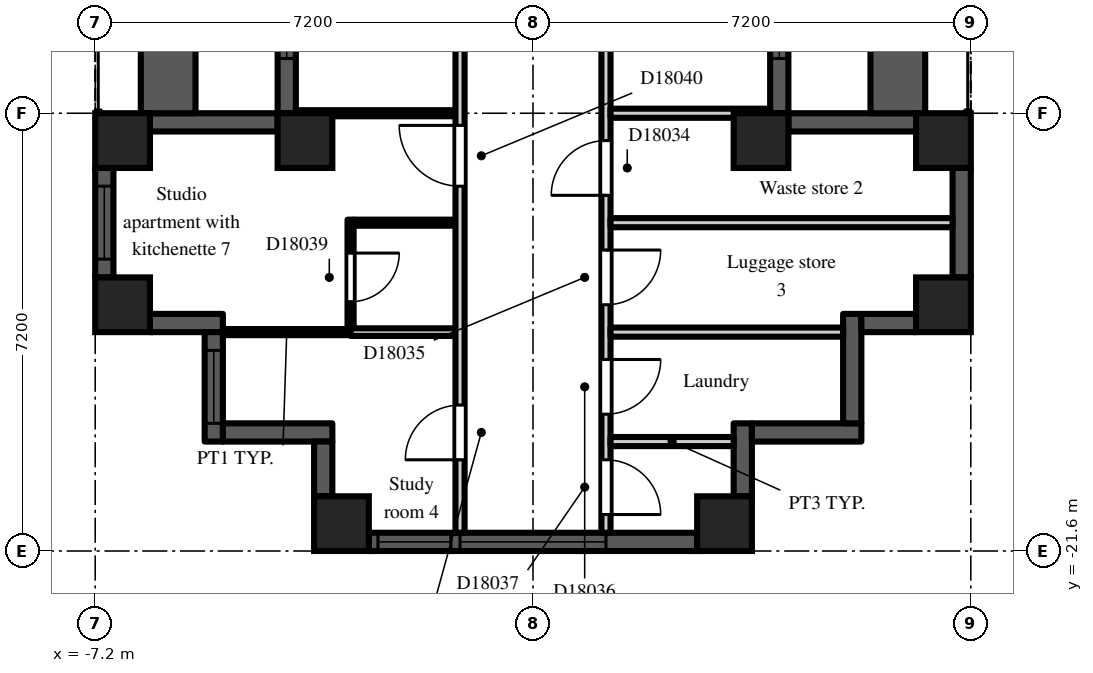
"""IFC4 building model, lengths in metres.
Left out: names, types, materials, properties, quantities, classifications, styles, units other than length and angle.
Written with IfcOpenShell. Run it as: python <this file> out.ifc"""

import sys

from ifc_helpers import new_model, si_unit, direction, frame, frame_2d, origin, origin_2d, place, context, subcontext, project, spatial, rectangle, extrude, element, fill, save


model = new_model("IFC4")
c1 = context("Model", 3, precision=1e-05, world=origin(), true_north=direction((0.0, 1.0)))
c2 = subcontext(c1, "Body", "Model", "MODEL_VIEW")
j1 = project(units=[si_unit("LENGTHUNIT", "METRE"), si_unit("PLANEANGLEUNIT", "RADIAN")], contexts=[c1])
p1 = place(None, origin())
s1 = spatial("IfcSite", under=j1, at=p1, CompositionType="ELEMENT")
p2 = place(p1, origin())
s2 = spatial("IfcBuilding", under=s1, at=p2, CompositionType="ELEMENT")
p3 = place(p2, frame((0.0, 0.0, 123.3)))
s3 = spatial("IfcBuildingStorey", under=s2, at=p3, CompositionType="ELEMENT", Elevation=123.3)
for number, where, z_axis, x_axis in (
    (1, (-6.75, -17.55, 0.0), (0.0, 0.0, 1.0), (1.0, 0.0, 0.0)),
    (2, (-6.75, -14.85, 0.0), (0.0, 0.0, 1.0), (1.0, 0.0, 0.0)),
    (3, (-3.75, -14.85, 0.0), (0.0, 0.0, 1.0), (1.0, 0.0, 0.0)),
    (4, (-3.15, -21.15, 0.0), (0.0, 0.0, 1.0), (1.0, 0.0, 0.0)),
    (5, (3.15, -21.15, 0.0), (0.0, 0.0, 1.0), (1.0, 0.0, 0.0)),
    (6, (3.75, -14.85, 0.0), (0.0, 0.0, 1.0), (1.0, 0.0, 0.0)),
    (7, (6.75, -17.55, 0.0), (0.0, 0.0, 1.0), (1.0, 0.0, 0.0)),
    (8, (6.75, -14.85, 0.0), (0.0, 0.0, 1.0), (1.0, 0.0, 0.0)),
):
    element("IfcColumn", number, at=place(p3, frame(where, z_axis=z_axis, x_axis=x_axis)), inside=s3, PredefinedType="COLUMN", context=c2, shape_type="SweptSolid", body=[
        extrude(rectangle(XDim=0.9, YDim=0.9, at=origin_2d()), origin(), (0.0, 0.0, 1.0), 3.0),
    ])
p4 = place(p3, frame((-4.05, -7.2, 0.0), z_axis=(0.0, 0.0, 1.0), x_axis=(0.0, -1.0, 0.0)))
e9 = element("IfcWall", 9, at=p4, inside=s3, PredefinedType="SOLIDWALL", context=c2, shape_type="SweptSolid", body=[
    extrude(rectangle(XDim=7.2, YDim=0.3, at=frame_2d((3.6, 0.0))), origin(), (0.0, 0.0, 1.0), 2.2),
])
p5 = place(p4, frame((3.0, 0.0, 0.0)))
e10 = element("IfcOpeningElement", 10, at=p5, cuts=e9, PredefinedType="OPENING", context=c2, shape_type="SweptSolid", body=[
    extrude(rectangle(XDim=1.2, YDim=2.05, at=frame_2d((0.6, 1.025))), frame((0.0, 0.16, 0.0), z_axis=(0.0, -1.0, 0.0), x_axis=(1.0, 0.0, 0.0)), (0.0, 0.0, 1.0), 0.32),
])
p6 = place(p4, frame((0.9, 0.0, 0.2)))
e11 = element("IfcOpeningElement", 11, at=p6, cuts=e9, PredefinedType="OPENING", context=c2, shape_type="SweptSolid", body=[
    extrude(rectangle(XDim=1.8, YDim=1.85, at=frame_2d((0.9, 0.925))), frame((0.0, 0.16, 0.0), z_axis=(0.0, -1.0, 0.0), x_axis=(1.0, 0.0, 0.0)), (0.0, 0.0, 1.0), 0.32),
])
p7 = place(p4, frame((4.5, 0.0, 0.2)))
e12 = element("IfcOpeningElement", 12, at=p7, cuts=e9, PredefinedType="OPENING", context=c2, shape_type="SweptSolid", body=[
    extrude(rectangle(XDim=1.8, YDim=1.85, at=frame_2d((0.9, 0.925))), frame((0.0, 0.16, 0.0), z_axis=(0.0, -1.0, 0.0), x_axis=(1.0, 0.0, 0.0)), (0.0, 0.0, 1.0), 0.32),
])
p8 = place(p3, frame((-4.2, -14.55, 0.0), z_axis=(0.0, 0.0, 1.0), x_axis=(-1.0, 0.0, 0.0)))
e13 = element("IfcWall", 13, at=p8, inside=s3, PredefinedType="SOLIDWALL", context=c2, shape_type="SweptSolid", body=[
    extrude(rectangle(XDim=2.1, YDim=0.3, at=frame_2d((1.05, 0.0))), origin(), (0.0, 0.0, 1.0), 2.2),
])
p9 = place(p3, frame((-7.05, -15.3, 0.0), z_axis=(0.0, 0.0, 1.0), x_axis=(0.0, -1.0, 0.0)))
e14 = element("IfcWall", 14, at=p9, inside=s3, PredefinedType="SOLIDWALL", context=c2, shape_type="SweptSolid", body=[
    extrude(rectangle(XDim=1.8, YDim=0.3, at=frame_2d((0.9, 0.0))), origin(), (0.0, 0.0, 1.0), 2.2),
])
p10 = place(p9, frame((0.3, 0.0, 0.2)))
e15 = element("IfcOpeningElement", 15, at=p10, cuts=e14, PredefinedType="OPENING", context=c2, shape_type="SweptSolid", body=[
    extrude(rectangle(XDim=1.2, YDim=1.85, at=frame_2d((0.6, 0.925))), frame((0.0, 0.16, 0.0), z_axis=(0.0, -1.0, 0.0), x_axis=(1.0, 0.0, 0.0)), (0.0, 0.0, 1.0), 0.32),
])
p11 = place(p3, frame((-6.3, -17.85, 0.0), z_axis=(0.0, 0.0, 1.0), x_axis=(1.0, 0.0, 0.0)))
e16 = element("IfcWall", 16, at=p11, inside=s3, PredefinedType="SOLIDWALL", context=c2, shape_type="SweptSolid", body=[
    extrude(rectangle(XDim=1.2, YDim=0.3, at=frame_2d((0.6, 0.0))), origin(), (0.0, 0.0, 1.0), 2.6),
])
p12 = place(p3, frame((-5.25, -18.0, 0.0), z_axis=(0.0, 0.0, 1.0), x_axis=(0.0, -1.0, 0.0)))
e17 = element("IfcWall", 17, at=p12, inside=s3, PredefinedType="SOLIDWALL", context=c2, shape_type="SweptSolid", body=[
    extrude(rectangle(XDim=1.8, YDim=0.3, at=frame_2d((0.9, 0.0))), origin(), (0.0, 0.0, 1.0), 2.6),
])
p13 = place(p12, frame((0.3, 0.0, 0.2)))
e18 = element("IfcOpeningElement", 18, at=p13, cuts=e17, PredefinedType="OPENING", context=c2, shape_type="SweptSolid", body=[
    extrude(rectangle(XDim=1.2, YDim=1.85, at=frame_2d((0.6, 0.925))), frame((0.0, 0.16, 0.0), z_axis=(0.0, -1.0, 0.0), x_axis=(1.0, 0.0, 0.0)), (0.0, 0.0, 1.0), 0.32),
])
p14 = place(p3, frame((-5.1, -19.65, 0.0), z_axis=(0.0, 0.0, 1.0), x_axis=(1.0, 0.0, 0.0)))
e19 = element("IfcWall", 19, at=p14, inside=s3, PredefinedType="SOLIDWALL", context=c2, shape_type="SweptSolid", body=[
    extrude(rectangle(XDim=1.8, YDim=0.3, at=frame_2d((0.9, 0.0))), origin(), (0.0, 0.0, 1.0), 2.6),
])
p15 = place(p3, frame((-3.45, -19.8, 0.0), z_axis=(0.0, 0.0, 1.0), x_axis=(0.0, -1.0, 0.0)))
e20 = element("IfcWall", 20, at=p15, inside=s3, PredefinedType="SOLIDWALL", context=c2, shape_type="SweptSolid", body=[
    extrude(rectangle(XDim=0.9, YDim=0.3, at=frame_2d((0.45, 0.0))), origin(), (0.0, 0.0, 1.0), 2.6),
])
p16 = place(p3, frame((-2.7, -21.45, 0.0), z_axis=(0.0, 0.0, 1.0), x_axis=(1.0, 0.0, 0.0)))
e21 = element("IfcWall", 21, at=p16, inside=s3, PredefinedType="SOLIDWALL", context=c2, shape_type="SweptSolid", body=[
    extrude(rectangle(XDim=5.4, YDim=0.3, at=frame_2d((2.7, 0.0))), origin(), (0.0, 0.0, 1.0), 2.2),
])
p17 = place(p16, frame((1.5, 0.0, 0.2)))
e22 = element("IfcOpeningElement", 22, at=p17, cuts=e21, PredefinedType="OPENING", context=c2, shape_type="SweptSolid", body=[
    extrude(rectangle(XDim=2.4, YDim=1.85, at=frame_2d((1.2, 0.925))), frame((0.0, 0.16, 0.0), z_axis=(0.0, -1.0, 0.0), x_axis=(1.0, 0.0, 0.0)), (0.0, 0.0, 1.0), 0.32),
])
p18 = place(p16, frame((0.15, 0.0, 0.2)))
e23 = element("IfcOpeningElement", 23, at=p18, cuts=e21, PredefinedType="OPENING", context=c2, shape_type="SweptSolid", body=[
    extrude(rectangle(XDim=1.2, YDim=1.85, at=frame_2d((0.6, 0.925))), frame((0.0, 0.16, 0.0), z_axis=(0.0, -1.0, 0.0), x_axis=(1.0, 0.0, 0.0)), (0.0, 0.0, 1.0), 0.32),
])
p19 = place(p3, frame((3.45, -20.7, 0.0), z_axis=(0.0, 0.0, 1.0), x_axis=(0.0, 1.0, 0.0)))
e24 = element("IfcWall", 24, at=p19, inside=s3, PredefinedType="SOLIDWALL", context=c2, shape_type="SweptSolid", body=[
    extrude(rectangle(XDim=1.2, YDim=0.3, at=frame_2d((0.6, 0.0))), origin(), (0.0, 0.0, 1.0), 2.6),
])
p20 = place(p3, frame((3.6, -19.65, 0.0), z_axis=(0.0, 0.0, 1.0), x_axis=(1.0, 0.0, 0.0)))
e25 = element("IfcWall", 25, at=p20, inside=s3, PredefinedType="SOLIDWALL", context=c2, shape_type="SweptSolid", body=[
    extrude(rectangle(XDim=1.8, YDim=0.3, at=frame_2d((0.9, 0.0))), origin(), (0.0, 0.0, 1.0), 2.6),
])
p21 = place(p3, frame((5.25, -19.5, 0.0), z_axis=(0.0, 0.0, 1.0), x_axis=(0.0, 1.0, 0.0)))
e26 = element("IfcWall", 26, at=p21, inside=s3, PredefinedType="SOLIDWALL", context=c2, shape_type="SweptSolid", body=[
    extrude(rectangle(XDim=1.8, YDim=0.3, at=frame_2d((0.9, 0.0))), origin(), (0.0, 0.0, 1.0), 2.6),
])
p22 = place(p3, frame((5.4, -17.85, 0.0), z_axis=(0.0, 0.0, 1.0), x_axis=(1.0, 0.0, 0.0)))
e27 = element("IfcWall", 27, at=p22, inside=s3, PredefinedType="SOLIDWALL", context=c2, shape_type="SweptSolid", body=[
    extrude(rectangle(XDim=0.9, YDim=0.3, at=frame_2d((0.45, 0.0))), origin(), (0.0, 0.0, 1.0), 2.6),
])
p23 = place(p3, frame((7.05, -17.1, 0.0), z_axis=(0.0, 0.0, 1.0), x_axis=(0.0, 1.0, 0.0)))
e28 = element("IfcWall", 28, at=p23, inside=s3, PredefinedType="SOLIDWALL", context=c2, shape_type="SweptSolid", body=[
    extrude(rectangle(XDim=1.8, YDim=0.3, at=frame_2d((0.9, 0.0))), origin(), (0.0, 0.0, 1.0), 2.2),
])
p24 = place(p3, frame((6.3, -14.55, 0.0), z_axis=(0.0, 0.0, 1.0), x_axis=(-1.0, 0.0, 0.0)))
e29 = element("IfcWall", 29, at=p24, inside=s3, PredefinedType="SOLIDWALL", context=c2, shape_type="SweptSolid", body=[
    extrude(rectangle(XDim=2.1, YDim=0.3, at=frame_2d((1.05, 0.0))), origin(), (0.0, 0.0, 1.0), 2.2),
])
p25 = place(p3, frame((4.05, -14.4, 0.0), z_axis=(0.0, 0.0, 1.0), x_axis=(0.0, 1.0, 0.0)))
e30 = element("IfcWall", 30, at=p25, inside=s3, PredefinedType="SOLIDWALL", context=c2, shape_type="SweptSolid", body=[
    extrude(rectangle(XDim=7.2, YDim=0.3, at=frame_2d((3.6, 0.0))), origin(), (0.0, 0.0, 1.0), 2.2),
])
p26 = place(p25, frame((3.0, 0.0, 0.0)))
e31 = element("IfcOpeningElement", 31, at=p26, cuts=e30, PredefinedType="OPENING", context=c2, shape_type="SweptSolid", body=[
    extrude(rectangle(XDim=1.2, YDim=2.05, at=frame_2d((0.6, 1.025))), frame((0.0, 0.16, 0.0), z_axis=(0.0, -1.0, 0.0), x_axis=(1.0, 0.0, 0.0)), (0.0, 0.0, 1.0), 0.32),
])
p27 = place(p25, frame((0.9, 0.0, 0.2)))
e32 = element("IfcOpeningElement", 32, at=p27, cuts=e30, PredefinedType="OPENING", context=c2, shape_type="SweptSolid", body=[
    extrude(rectangle(XDim=1.8, YDim=1.85, at=frame_2d((0.9, 0.925))), frame((0.0, 0.16, 0.0), z_axis=(0.0, -1.0, 0.0), x_axis=(1.0, 0.0, 0.0)), (0.0, 0.0, 1.0), 0.32),
])
p28 = place(p25, frame((4.5, 0.0, 0.2)))
e33 = element("IfcOpeningElement", 33, at=p28, cuts=e30, PredefinedType="OPENING", context=c2, shape_type="SweptSolid", body=[
    extrude(rectangle(XDim=1.8, YDim=1.85, at=frame_2d((0.9, 0.925))), frame((0.0, 0.16, 0.0), z_axis=(0.0, -1.0, 0.0), x_axis=(1.0, 0.0, 0.0)), (0.0, 0.0, 1.0), 0.32),
])
for number, where, z_axis, x_axis in (
    (34, (6.0, -14.4, 0.0), (0.0, 0.0, 1.0), (0.0, 1.0, 0.0)),
    (35, (-6.0, -14.4, 0.0), (0.0, 0.0, 1.0), (0.0, 1.0, 0.0)),
):
    element("IfcWall", number, at=place(p3, frame(where, z_axis=z_axis, x_axis=x_axis)), inside=s3, PredefinedType="PARAPET", context=c2, shape_type="SweptSolid", body=[
        extrude(rectangle(XDim=7.2, YDim=0.9, at=frame_2d((3.6, 0.0))), origin(), (0.0, 0.0, 1.0), 0.8),
    ])
p29 = place(p3, frame((-5.1, -18.0, 0.0), z_axis=(0.0, 0.0, 1.0), x_axis=(1.0, 0.0, 0.0)))
e36 = element("IfcWall", 36, at=p29, inside=s3, PredefinedType="PARTITIONING", context=c2, shape_type="SweptSolid", body=[
    extrude(rectangle(XDim=2.1, YDim=0.1, at=frame_2d((1.05, 0.0))), origin(), (0.0, 0.0, 1.0), 2.6),
])
p30 = place(p3, frame((-3.9, -14.4, 0.0), z_axis=(0.0, 0.0, 1.0), x_axis=(1.0, 0.0, 0.0)))
e37 = element("IfcWall", 37, at=p30, inside=s3, PredefinedType="PARTITIONING", context=c2, shape_type="SweptSolid", body=[
    extrude(rectangle(XDim=2.625, YDim=0.1, at=frame_2d((1.312, 0.0))), origin(), (0.0, 0.0, 1.0), 2.6),
])
p31 = place(p3, frame((-3.0, -17.938, 0.0), z_axis=(0.0, 0.0, 1.0), x_axis=(0.0, 1.0, 0.0)))
e38 = element("IfcWall", 38, at=p31, inside=s3, PredefinedType="PARTITIONING", context=c2, shape_type="SweptSolid", body=[
    extrude(rectangle(XDim=1.788, YDim=0.1, at=frame_2d((0.894, 0.0))), origin(), (0.0, 0.0, 1.0), 2.6),
])
p32 = place(p31, frame((0.438, 0.0, 0.0)))
e39 = element("IfcOpeningElement", 39, at=p32, cuts=e38, PredefinedType="OPENING", context=c2, shape_type="SweptSolid", body=[
    extrude(rectangle(XDim=0.8, YDim=2.1, at=frame_2d((0.4, 1.05))), frame((0.0, 0.06, 0.0), z_axis=(0.0, -1.0, 0.0), x_axis=(1.0, 0.0, 0.0)), (0.0, 0.0, 1.0), 0.12),
])
p33 = place(p3, frame((-3.0, -18.0, 0.0), z_axis=(0.0, 0.0, 1.0), x_axis=(1.0, 0.0, 0.0)))
e40 = element("IfcWall", 40, at=p33, inside=s3, PredefinedType="PARTITIONING", context=c2, shape_type="SweptSolid", body=[
    extrude(rectangle(XDim=1.725, YDim=0.125, at=frame_2d((0.863, 0.0))), origin(), (0.0, 0.0, 1.0), 2.6),
])
p34 = place(p3, frame((-2.95, -16.2, 0.0), z_axis=(0.0, 0.0, 1.0), x_axis=(1.0, 0.0, 0.0)))
e41 = element("IfcWall", 41, at=p34, inside=s3, PredefinedType="PARTITIONING", context=c2, shape_type="SweptSolid", body=[
    extrude(rectangle(XDim=1.675, YDim=0.1, at=frame_2d((0.837, 0.0))), origin(), (0.0, 0.0, 1.0), 2.6),
])
p35 = place(p3, frame((-1.2, -21.3, 0.0), z_axis=(0.0, 0.0, 1.0), x_axis=(0.0, 1.0, 0.0)))
e42 = element("IfcWall", 42, at=p35, inside=s3, PredefinedType="PARTITIONING", context=c2, shape_type="SweptSolid", body=[
    extrude(rectangle(XDim=14.025, YDim=0.15, at=frame_2d((7.013, 0.0))), origin(), (0.0, 0.0, 1.0), 2.6),
])
p36 = place(p35, frame((11.85, 0.0, 0.0)))
e43 = element("IfcOpeningElement", 43, at=p36, cuts=e42, PredefinedType="OPENING", context=c2, shape_type="SweptSolid", body=[
    extrude(rectangle(XDim=0.9, YDim=2.1, at=frame_2d((0.45, 1.05))), frame((0.0, 0.085, 0.0), z_axis=(0.0, -1.0, 0.0), x_axis=(1.0, 0.0, 0.0)), (0.0, 0.0, 1.0), 0.17),
])
p37 = place(p35, frame((5.7, 0.0, 0.0)))
e44 = element("IfcOpeningElement", 44, at=p37, cuts=e42, PredefinedType="OPENING", context=c2, shape_type="SweptSolid", body=[
    extrude(rectangle(XDim=1.0, YDim=2.1, at=frame_2d((0.5, 1.05))), frame((0.0, 0.085, 0.0), z_axis=(0.0, -1.0, 0.0), x_axis=(1.0, 0.0, 0.0)), (0.0, 0.0, 1.0), 0.17),
])
p38 = place(p35, frame((1.2, 0.0, 0.0)))
e45 = element("IfcOpeningElement", 45, at=p38, cuts=e42, PredefinedType="OPENING", context=c2, shape_type="SweptSolid", body=[
    extrude(rectangle(XDim=0.9, YDim=2.1, at=frame_2d((0.45, 1.05))), frame((0.0, 0.085, 0.0), z_axis=(0.0, -1.0, 0.0), x_axis=(1.0, 0.0, 0.0)), (0.0, 0.0, 1.0), 0.17),
])
p39 = place(p3, frame((1.2, -21.3, 0.0), z_axis=(0.0, 0.0, 1.0), x_axis=(0.0, 1.0, 0.0)))
e46 = element("IfcWall", 46, at=p39, inside=s3, PredefinedType="PARTITIONING", context=c2, shape_type="SweptSolid", body=[
    extrude(rectangle(XDim=14.175, YDim=0.15, at=frame_2d((7.087, 0.0))), origin(), (0.0, 0.0, 1.0), 2.6),
])
p40 = place(p39, frame((8.25, 0.0, 0.0)))
e47 = element("IfcOpeningElement", 47, at=p40, cuts=e46, PredefinedType="OPENING", context=c2, shape_type="SweptSolid", body=[
    extrude(rectangle(XDim=0.9, YDim=2.1, at=frame_2d((0.45, 1.05))), frame((0.0, 0.085, 0.0), z_axis=(0.0, -1.0, 0.0), x_axis=(1.0, 0.0, 0.0)), (0.0, 0.0, 1.0), 0.17),
])
p41 = place(p39, frame((5.55, 0.0, 0.0)))
e48 = element("IfcOpeningElement", 48, at=p41, cuts=e46, PredefinedType="OPENING", context=c2, shape_type="SweptSolid", body=[
    extrude(rectangle(XDim=0.9, YDim=2.1, at=frame_2d((0.45, 1.05))), frame((0.0, 0.085, 0.0), z_axis=(0.0, -1.0, 0.0), x_axis=(1.0, 0.0, 0.0)), (0.0, 0.0, 1.0), 0.17),
])
p42 = place(p39, frame((3.75, 0.0, 0.0)))
e49 = element("IfcOpeningElement", 49, at=p42, cuts=e46, PredefinedType="OPENING", context=c2, shape_type="SweptSolid", body=[
    extrude(rectangle(XDim=0.9, YDim=2.1, at=frame_2d((0.45, 1.05))), frame((0.0, 0.085, 0.0), z_axis=(0.0, -1.0, 0.0), x_axis=(1.0, 0.0, 0.0)), (0.0, 0.0, 1.0), 0.17),
])
p43 = place(p39, frame((1.95, 0.0, 0.0)))
e50 = element("IfcOpeningElement", 50, at=p43, cuts=e46, PredefinedType="OPENING", context=c2, shape_type="SweptSolid", body=[
    extrude(rectangle(XDim=0.9, YDim=2.1, at=frame_2d((0.45, 1.05))), frame((0.0, 0.085, 0.0), z_axis=(0.0, -1.0, 0.0), x_axis=(1.0, 0.0, 0.0)), (0.0, 0.0, 1.0), 0.17),
])
p44 = place(p39, frame((0.3, 0.0, 0.0)))
e51 = element("IfcOpeningElement", 51, at=p44, cuts=e46, PredefinedType="OPENING", context=c2, shape_type="SweptSolid", body=[
    extrude(rectangle(XDim=0.9, YDim=2.1, at=frame_2d((0.45, 1.05))), frame((0.0, 0.085, 0.0), z_axis=(0.0, -1.0, 0.0), x_axis=(1.0, 0.0, 0.0)), (0.0, 0.0, 1.0), 0.17),
])
p45 = place(p3, frame((1.275, -19.8, 0.0), z_axis=(0.0, 0.0, 1.0), x_axis=(1.0, 0.0, 0.0)))
e52 = element("IfcWall", 52, at=p45, inside=s3, PredefinedType="PARTITIONING", context=c2, shape_type="SweptSolid", body=[
    extrude(rectangle(XDim=2.025, YDim=0.15, at=frame_2d((1.013, 0.0))), origin(), (0.0, 0.0, 1.0), 2.6),
])
p46 = place(p3, frame((1.275, -18.0, 0.0), z_axis=(0.0, 0.0, 1.0), x_axis=(1.0, 0.0, 0.0)))
e53 = element("IfcWall", 53, at=p46, inside=s3, PredefinedType="PARTITIONING", context=c2, shape_type="SweptSolid", body=[
    extrude(rectangle(XDim=3.825, YDim=0.15, at=frame_2d((1.913, 0.0))), origin(), (0.0, 0.0, 1.0), 2.6),
])
p47 = place(p3, frame((1.275, -16.2, 0.0), z_axis=(0.0, 0.0, 1.0), x_axis=(1.0, 0.0, 0.0)))
e54 = element("IfcWall", 54, at=p47, inside=s3, PredefinedType="PARTITIONING", context=c2, shape_type="SweptSolid", body=[
    extrude(rectangle(XDim=5.625, YDim=0.15, at=frame_2d((2.812, 0.0))), origin(), (0.0, 0.0, 1.0), 2.6),
])
p48 = place(p3, frame((1.275, -14.4, 0.0), z_axis=(0.0, 0.0, 1.0), x_axis=(1.0, 0.0, 0.0)))
e55 = element("IfcWall", 55, at=p48, inside=s3, PredefinedType="PARTITIONING", context=c2, shape_type="SweptSolid", body=[
    extrude(rectangle(XDim=2.625, YDim=0.15, at=frame_2d((1.312, 0.0))), origin(), (0.0, 0.0, 1.0), 2.6),
])
p49 = place(p7, origin())
e56 = element("IfcWindow", 56, at=p49, inside=s3, PartitioningType="SINGLE_PANEL", PredefinedType="WINDOW", context=c2, shape_type="SweptSolid", body=[
    extrude(rectangle(XDim=1.8, YDim=1.85, at=frame_2d((0.9, 0.925))), frame((0.0, 0.03, 0.0), z_axis=(0.0, -1.0, 0.0), x_axis=(1.0, 0.0, 0.0)), (0.0, 0.0, 1.0), 0.06),
])
fill(e12, e56)
p50 = place(p10, origin())
e57 = element("IfcWindow", 57, at=p50, inside=s3, PartitioningType="SINGLE_PANEL", PredefinedType="WINDOW", context=c2, shape_type="SweptSolid", body=[
    extrude(rectangle(XDim=1.2, YDim=1.85, at=frame_2d((0.6, 0.925))), frame((0.0, 0.03, 0.0), z_axis=(0.0, -1.0, 0.0), x_axis=(1.0, 0.0, 0.0)), (0.0, 0.0, 1.0), 0.06),
])
fill(e15, e57)
p51 = place(p13, origin())
e58 = element("IfcWindow", 58, at=p51, inside=s3, PartitioningType="SINGLE_PANEL", PredefinedType="WINDOW", context=c2, shape_type="SweptSolid", body=[
    extrude(rectangle(XDim=1.2, YDim=1.85, at=frame_2d((0.6, 0.925))), frame((0.0, 0.03, 0.0), z_axis=(0.0, -1.0, 0.0), x_axis=(1.0, 0.0, 0.0)), (0.0, 0.0, 1.0), 0.06),
])
fill(e18, e58)
p52 = place(p17, origin())
e59 = element("IfcWindow", 59, at=p52, inside=s3, PartitioningType="SINGLE_PANEL", PredefinedType="WINDOW", context=c2, shape_type="SweptSolid", body=[
    extrude(rectangle(XDim=2.4, YDim=1.85, at=frame_2d((1.2, 0.925))), frame((0.0, 0.03, 0.0), z_axis=(0.0, -1.0, 0.0), x_axis=(1.0, 0.0, 0.0)), (0.0, 0.0, 1.0), 0.06),
])
fill(e22, e59)
p53 = place(p18, origin())
e60 = element("IfcWindow", 60, at=p53, inside=s3, PartitioningType="SINGLE_PANEL", PredefinedType="WINDOW", context=c2, shape_type="SweptSolid", body=[
    extrude(rectangle(XDim=1.2, YDim=1.85, at=frame_2d((0.6, 0.925))), frame((0.0, 0.03, 0.0), z_axis=(0.0, -1.0, 0.0), x_axis=(1.0, 0.0, 0.0)), (0.0, 0.0, 1.0), 0.06),
])
fill(e23, e60)
p54 = place(p27, origin())
e61 = element("IfcWindow", 61, at=p54, inside=s3, PartitioningType="SINGLE_PANEL", PredefinedType="WINDOW", context=c2, shape_type="SweptSolid", body=[
    extrude(rectangle(XDim=1.8, YDim=1.85, at=frame_2d((0.9, 0.925))), frame((0.0, 0.03, 0.0), z_axis=(0.0, -1.0, 0.0), x_axis=(1.0, 0.0, 0.0)), (0.0, 0.0, 1.0), 0.06),
])
fill(e32, e61)
p55 = place(p41, origin())
e62 = element("IfcDoor", 62, at=p55, inside=s3, OperationType="SINGLE_SWING_LEFT", PredefinedType="DOOR", context=c2, shape_type="SweptSolid", body=[
    extrude(rectangle(XDim=0.9, YDim=2.1, at=frame_2d((0.45, 1.05))), frame((0.0, 0.025, 0.0), z_axis=(0.0, -1.0, 0.0), x_axis=(1.0, 0.0, 0.0)), (0.0, 0.0, 1.0), 0.05),
])
fill(e48, e62)
p56 = place(p42, frame((0.9, 0.0, 0.0), z_axis=(0.0, 0.0, 1.0), x_axis=(-1.0, 0.0, 0.0)))
e63 = element("IfcDoor", 63, at=p56, inside=s3, OperationType="SINGLE_SWING_LEFT", PredefinedType="DOOR", context=c2, shape_type="SweptSolid", body=[
    extrude(rectangle(XDim=0.9, YDim=2.1, at=frame_2d((0.45, 1.05))), frame((0.0, 0.025, 0.0), z_axis=(0.0, -1.0, 0.0), x_axis=(1.0, 0.0, 0.0)), (0.0, 0.0, 1.0), 0.05),
])
fill(e49, e63)
p57 = place(p43, frame((0.9, 0.0, 0.0), z_axis=(0.0, 0.0, 1.0), x_axis=(-1.0, 0.0, 0.0)))
e64 = element("IfcDoor", 64, at=p57, inside=s3, OperationType="SINGLE_SWING_LEFT", PredefinedType="DOOR", context=c2, shape_type="SweptSolid", body=[
    extrude(rectangle(XDim=0.9, YDim=2.1, at=frame_2d((0.45, 1.05))), frame((0.0, 0.025, 0.0), z_axis=(0.0, -1.0, 0.0), x_axis=(1.0, 0.0, 0.0)), (0.0, 0.0, 1.0), 0.05),
])
fill(e50, e64)
p58 = place(p44, frame((0.9, 0.0, 0.0), z_axis=(0.0, 0.0, 1.0), x_axis=(-1.0, 0.0, 0.0)))
e65 = element("IfcDoor", 65, at=p58, inside=s3, OperationType="SINGLE_SWING_RIGHT", PredefinedType="DOOR", context=c2, shape_type="SweptSolid", body=[
    extrude(rectangle(XDim=0.9, YDim=2.1, at=frame_2d((0.45, 1.05))), frame((0.0, 0.025, 0.0), z_axis=(0.0, -1.0, 0.0), x_axis=(1.0, 0.0, 0.0)), (0.0, 0.0, 1.0), 0.05),
])
fill(e51, e65)
p59 = place(p32, frame((0.8, 0.0, 0.0), z_axis=(0.0, 0.0, 1.0), x_axis=(-1.0, 0.0, 0.0)))
e66 = element("IfcDoor", 66, at=p59, inside=s3, OperationType="SINGLE_SWING_LEFT", PredefinedType="DOOR", context=c2, shape_type="SweptSolid", body=[
    extrude(rectangle(XDim=0.8, YDim=2.1, at=frame_2d((0.4, 1.05))), frame((0.0, 0.025, 0.0), z_axis=(0.0, -1.0, 0.0), x_axis=(1.0, 0.0, 0.0)), (0.0, 0.0, 1.0), 0.05),
])
fill(e39, e66)
p60 = place(p37, origin())
e67 = element("IfcDoor", 67, at=p60, inside=s3, OperationType="SINGLE_SWING_RIGHT", PredefinedType="DOOR", context=c2, shape_type="SweptSolid", body=[
    extrude(rectangle(XDim=1.0, YDim=2.1, at=frame_2d((0.5, 1.05))), frame((0.0, 0.025, 0.0), z_axis=(0.0, -1.0, 0.0), x_axis=(1.0, 0.0, 0.0)), (0.0, 0.0, 1.0), 0.05),
])
fill(e44, e67)
p61 = place(p38, origin())
e68 = element("IfcDoor", 68, at=p61, inside=s3, OperationType="SINGLE_SWING_LEFT", PredefinedType="DOOR", context=c2, shape_type="SweptSolid", body=[
    extrude(rectangle(XDim=0.9, YDim=2.1, at=frame_2d((0.45, 1.05))), frame((0.0, 0.025, 0.0), z_axis=(0.0, -1.0, 0.0), x_axis=(1.0, 0.0, 0.0)), (0.0, 0.0, 1.0), 0.05),
])
fill(e45, e68)
save(model, sys.argv[1])
